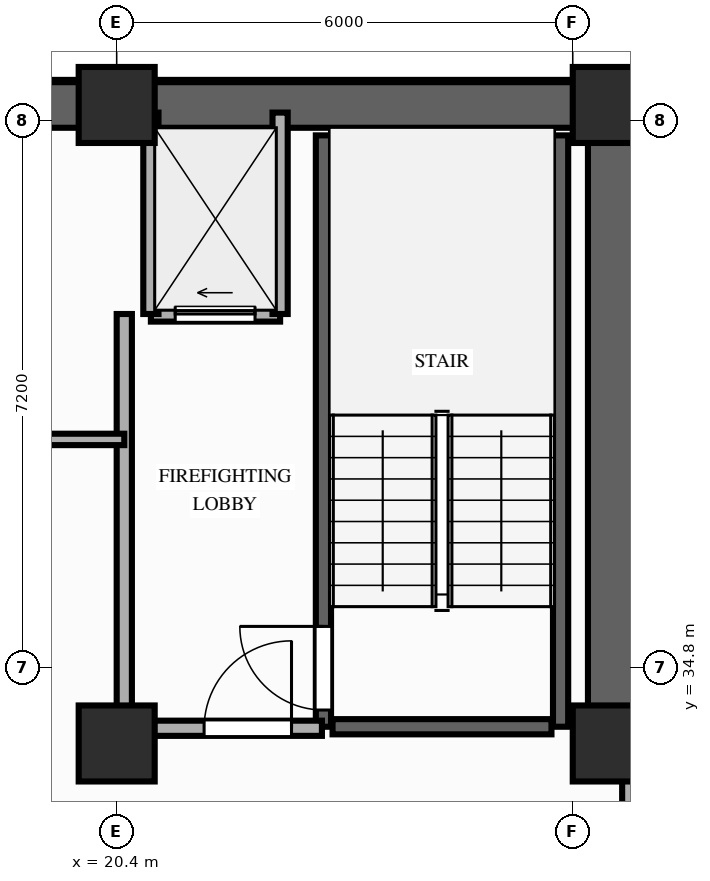
"""IFC4 building model, lengths in metres.
Left out: names, types, materials, properties, quantities, classifications, styles, units other than length and angle.
Written with IfcOpenShell. Run it as: python <this file> out.ifc"""

import sys

from ifc_helpers import new_model, si_unit, direction, frame, frame_2d, origin, origin_2d, place, context, subcontext, project, spatial, rectangle, extrude, element, fill, save


model = new_model("IFC4")
c1 = context("Model", 3, precision=1e-05, world=origin(), true_north=direction((0.0, 1.0)))
c2 = subcontext(c1, "Body", "Model", "MODEL_VIEW")
j1 = project(units=[si_unit("LENGTHUNIT", "METRE"), si_unit("PLANEANGLEUNIT", "RADIAN")], contexts=[c1])
p1 = place(None, origin())
s1 = spatial("IfcSite", under=j1, at=p1, CompositionType="ELEMENT")
p2 = place(p1, origin())
s2 = spatial("IfcBuilding", under=s1, at=p2, CompositionType="ELEMENT")
p3 = place(p2, frame((0.0, 0.0, 120.2)))
s3 = spatial("IfcBuildingStorey", under=s2, at=p3, CompositionType="ELEMENT", Elevation=120.2)
for number, where, z_axis, x_axis in (
    (1, (20.4, 33.8, 0.0), (0.0, 0.0, 1.0), (1.0, 0.0, 0.0)),
    (2, (26.9, 33.8, 0.0), (0.0, 0.0, 1.0), (1.0, 0.0, 0.0)),
    (3, (20.4, 42.2, 0.0), (0.0, 0.0, 1.0), (1.0, 0.0, 0.0)),
    (4, (26.9, 42.2, 0.0), (0.0, 0.0, 1.0), (1.0, 0.0, 0.0)),
):
    element("IfcColumn", number, at=place(p3, frame(where, z_axis=z_axis, x_axis=x_axis)), inside=s3, PredefinedType="COLUMN", context=c2, shape_type="SweptSolid", body=[
        extrude(rectangle(XDim=1.0, YDim=1.0, at=origin_2d()), origin(), (0.0, 0.0, 1.0), 3.2),
    ])
p4 = place(p3, frame((6.45, 42.2, 0.0), z_axis=(0.0, 0.0, 1.0), x_axis=(1.0, 0.0, 0.0)))
e5 = element("IfcWall", 5, at=p4, inside=s3, PredefinedType="SHEAR", context=c2, shape_type="SweptSolid", body=[
    extrude(rectangle(XDim=20.45, YDim=0.6, at=frame_2d((10.225, 0.0))), origin(), (0.0, 0.0, 1.0), 3.02),
])
p5 = place(p3, frame((26.9, 33.8, 0.0), z_axis=(0.0, 0.0, 1.0), x_axis=(0.0, 1.0, 0.0)))
e6 = element("IfcWall", 6, at=p5, inside=s3, PredefinedType="SHEAR", context=c2, shape_type="SweptSolid", body=[
    extrude(rectangle(XDim=7.95, YDim=0.6, at=frame_2d((3.975, 0.0))), origin(), (0.0, 0.0, 1.0), 3.02),
])
p6 = place(p3, frame((23.12, 34.02, 0.0), z_axis=(0.0, 0.0, 1.0), x_axis=(0.0, 1.0, 0.0)))
e7 = element("IfcWall", 7, at=p6, inside=s3, PredefinedType="SHEAR", context=c2, shape_type="SweptSolid", body=[
    extrude(rectangle(XDim=7.78, YDim=0.2, at=frame_2d((3.89, 0.0))), origin(), (0.0, 0.0, 1.0), 3.02),
])
p7 = place(p6, frame((0.22, 0.0, 0.0)))
e8 = element("IfcOpeningElement", 8, at=p7, cuts=e7, PredefinedType="OPENING", context=c2, shape_type="SweptSolid", body=[
    extrude(rectangle(XDim=1.1, YDim=2.15, at=frame_2d((0.55, 1.075))), frame((0.0, 0.11, 0.0), z_axis=(0.0, -1.0, 0.0), x_axis=(1.0, 0.0, 0.0)), (0.0, 0.0, 1.0), 0.22),
])
p8 = place(p3, frame((26.24, 34.02, 0.0), z_axis=(0.0, 0.0, 1.0), x_axis=(0.0, 1.0, 0.0)))
e9 = element("IfcWall", 9, at=p8, inside=s3, PredefinedType="SHEAR", context=c2, shape_type="SweptSolid", body=[
    extrude(rectangle(XDim=7.78, YDim=0.2, at=frame_2d((3.89, 0.0))), origin(), (0.0, 0.0, 1.0), 3.02),
])
p9 = place(p3, frame((23.24, 34.02, 0.0), z_axis=(0.0, 0.0, 1.0), x_axis=(1.0, 0.0, 0.0)))
e10 = element("IfcWall", 10, at=p9, inside=s3, PredefinedType="SHEAR", context=c2, shape_type="SweptSolid", body=[
    extrude(rectangle(XDim=2.88, YDim=0.2, at=frame_2d((1.44, 0.0))), origin(), (0.0, 0.0, 1.0), 3.02),
])
p10 = place(p3, frame((20.85, 39.45, 0.0), z_axis=(0.0, 0.0, 1.0), x_axis=(1.0, 0.0, 0.0)))
e11 = element("IfcWall", 11, at=p10, inside=s3, PredefinedType="MOVABLE", context=c2, shape_type="SweptSolid", body=[
    extrude(rectangle(XDim=1.7, YDim=0.2, at=frame_2d((0.85, 0.0))), origin(), (0.0, 0.0, 1.0), 3.02),
])
p11 = place(p10, frame((0.32, 0.0, 0.0)))
e12 = element("IfcOpeningElement", 12, at=p11, cuts=e11, PredefinedType="OPENING", context=c2, shape_type="SweptSolid", body=[
    extrude(rectangle(XDim=1.05, YDim=2.15, at=frame_2d((0.525, 1.075))), frame((0.0, 0.11, 0.0), z_axis=(0.0, -1.0, 0.0), x_axis=(1.0, 0.0, 0.0)), (0.0, 0.0, 1.0), 0.22),
])
for number, where, z_axis, x_axis in (
    (13, (20.85, 39.45, 0.0), (0.0, 0.0, 1.0), (0.0, 1.0, 0.0)),
    (14, (22.55, 39.45, 0.0), (0.0, 0.0, 1.0), (0.0, 1.0, 0.0)),
):
    element("IfcWall", number, at=place(p3, frame(where, z_axis=z_axis, x_axis=x_axis)), inside=s3, PredefinedType="MOVABLE", context=c2, shape_type="SweptSolid", body=[
        extrude(rectangle(XDim=2.65, YDim=0.2, at=frame_2d((1.325, 0.0))), origin(), (0.0, 0.0, 1.0), 2.41),
    ])
p12 = place(p3, frame((20.5, 34.0, 0.0), z_axis=(0.0, 0.0, 1.0), x_axis=(0.0, 1.0, 0.0)))
e15 = element("IfcWall", 15, at=p12, inside=s3, PredefinedType="PARTITIONING", context=c2, shape_type="SweptSolid", body=[
    extrude(rectangle(XDim=5.45, YDim=0.2, at=frame_2d((2.725, 0.0))), origin(), (0.0, 0.0, 1.0), 2.41),
])
p13 = place(p3, frame((20.5, 34.0, 0.0), z_axis=(0.0, 0.0, 1.0), x_axis=(1.0, 0.0, 0.0)))
e16 = element("IfcWall", 16, at=p13, inside=s3, PredefinedType="PARTITIONING", context=c2, shape_type="SweptSolid", body=[
    extrude(rectangle(XDim=2.6, YDim=0.2, at=frame_2d((1.3, 0.0))), origin(), (0.0, 0.0, 1.0), 2.41),
])
p14 = place(p13, frame((1.05, 0.0, 0.0)))
e17 = element("IfcOpeningElement", 17, at=p14, cuts=e16, PredefinedType="OPENING", context=c2, shape_type="SweptSolid", body=[
    extrude(rectangle(XDim=1.15, YDim=2.15, at=frame_2d((0.575, 1.075))), frame((0.0, 0.11, 0.0), z_axis=(0.0, -1.0, 0.0), x_axis=(1.0, 0.0, 0.0)), (0.0, 0.0, 1.0), 0.22),
])
p15 = place(p3, frame((12.9, 37.8, 0.0), z_axis=(0.0, 0.0, 1.0), x_axis=(1.0, 0.0, 0.0)))
e18 = element("IfcWall", 18, at=p15, inside=s3, PredefinedType="PARTITIONING", context=c2, shape_type="SweptSolid", body=[
    extrude(rectangle(XDim=7.6, YDim=0.15, at=frame_2d((3.8, 0.0))), origin(), (0.0, 0.0, 1.0), 3.02),
])
p16 = place(p15, frame((1.3, 0.0, 0.0)))
e19 = element("IfcOpeningElement", 19, at=p16, cuts=e18, PredefinedType="OPENING", context=c2, shape_type="SweptSolid", body=[
    extrude(rectangle(XDim=0.95, YDim=2.15, at=frame_2d((0.475, 1.075))), frame((0.0, 0.085, 0.0), z_axis=(0.0, -1.0, 0.0), x_axis=(1.0, 0.0, 0.0)), (0.0, 0.0, 1.0), 0.17),
])
p17 = place(p15, frame((5.1, 0.0, 0.0)))
e20 = element("IfcOpeningElement", 20, at=p17, cuts=e18, PredefinedType="OPENING", context=c2, shape_type="SweptSolid", body=[
    extrude(rectangle(XDim=0.95, YDim=2.15, at=frame_2d((0.475, 1.075))), frame((0.0, 0.085, 0.0), z_axis=(0.0, -1.0, 0.0), x_axis=(1.0, 0.0, 0.0)), (0.0, 0.0, 1.0), 0.17),
])
p18 = place(p3, frame((27.15, 32.0, 0.0), z_axis=(0.0, 0.0, 1.0), x_axis=(0.0, 1.0, 0.0)))
e21 = element("IfcWall", 21, at=p18, inside=s3, PredefinedType="PARTITIONING", context=c2, shape_type="SweptSolid", body=[
    extrude(rectangle(XDim=1.68, YDim=0.2, at=frame_2d((0.84, 0.0))), origin(), (0.0, 0.0, 1.0), 2.41),
])
p19 = place(p7, origin())
e22 = element("IfcDoor", 22, at=p19, inside=s3, OperationType="SINGLE_SWING_RIGHT", PredefinedType="DOOR", context=c2, shape_type="SweptSolid", body=[
    extrude(rectangle(XDim=1.1, YDim=2.15, at=frame_2d((0.55, 1.075))), frame((0.0, 0.025, 0.0), z_axis=(0.0, -1.0, 0.0), x_axis=(1.0, 0.0, 0.0)), (0.0, 0.0, 1.0), 0.05),
])
fill(e8, e22)
p20 = place(p11, origin())
e23 = element("IfcDoor", 23, at=p20, inside=s3, OperationType="SLIDING_TO_LEFT", PredefinedType="DOOR", context=c2, shape_type="SweptSolid", body=[
    extrude(rectangle(XDim=1.05, YDim=2.15, at=frame_2d((0.525, 1.075))), frame((0.0, 0.025, 0.0), z_axis=(0.0, -1.0, 0.0), x_axis=(1.0, 0.0, 0.0)), (0.0, 0.0, 1.0), 0.05),
])
fill(e12, e23)
p21 = place(p14, origin())
e24 = element("IfcDoor", 24, at=p21, inside=s3, OperationType="SINGLE_SWING_RIGHT", PredefinedType="DOOR", context=c2, shape_type="SweptSolid", body=[
    extrude(rectangle(XDim=1.15, YDim=2.15, at=frame_2d((0.575, 1.075))), frame((0.0, 0.025, 0.0), z_axis=(0.0, -1.0, 0.0), x_axis=(1.0, 0.0, 0.0)), (0.0, 0.0, 1.0), 0.05),
])
fill(e17, e24)
save(model, sys.argv[1])
